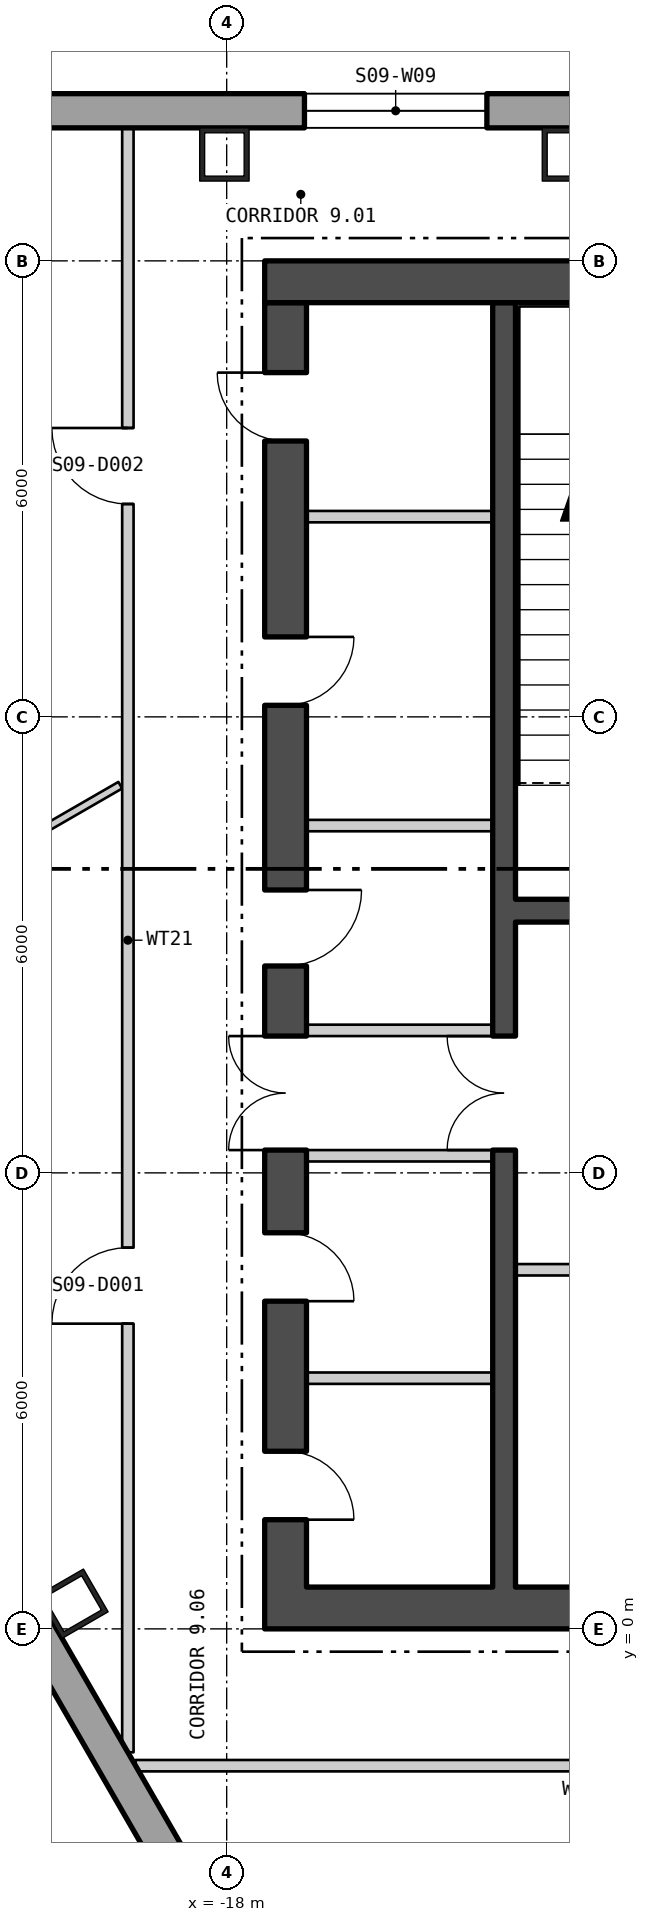
"""IFC4 building model, lengths in metres.
Left out: names, types, materials, properties, quantities, classifications, styles, units other than length and angle.
Written with IfcOpenShell. Run it as: python <this file> out.ifc"""

import sys

from ifc_helpers import new_model, si_unit, direction, frame, frame_2d, origin, origin_2d, place, context, subcontext, project, spatial, polyline, rectangle, hollow_rectangle, outline, extrude, element, fill, save


model = new_model("IFC4")
c1 = context("Model", 3, precision=1e-05, world=origin(), true_north=direction((0.0, 1.0)))
c2 = subcontext(c1, "Body", "Model", "MODEL_VIEW")
j1 = project(units=[si_unit("LENGTHUNIT", "METRE"), si_unit("PLANEANGLEUNIT", "RADIAN")], contexts=[c1])
p1 = place(None, origin())
s1 = spatial("IfcSite", under=j1, at=p1, CompositionType="ELEMENT")
p2 = place(p1, origin())
s2 = spatial("IfcBuilding", under=s1, at=p2, CompositionType="ELEMENT")
p3 = place(p2, frame((0.0, 0.0, 124.8)))
s3 = spatial("IfcBuildingStorey", under=s2, at=p3, CompositionType="ELEMENT", Elevation=124.8)
for number, where, z_axis, x_axis in (
    (1, (-13.523, 19.4, 0.0), (0.0, 0.0, 1.0), (-1.0, 0.0, 0.0)),
    (2, (-18.03, 19.4, 0.0), (0.0, 0.0, 1.0), (-1.0, 0.0, 0.0)),
    (3, (-20.025, 0.331, 0.0), (0.0, 0.0, 1.0), (0.5, -0.866, 0.0)),
):
    element("IfcColumn", number, at=place(p3, frame(where, z_axis=z_axis, x_axis=x_axis)), inside=s3, PredefinedType="COLUMN", context=c2, shape_type="SweptSolid", body=[
        extrude(hollow_rectangle(XDim=0.65, YDim=0.7, WallThickness=0.065, at=origin_2d()), origin(), (0.0, 0.0, 1.0), 4.5),
    ])
p4 = place(p3, frame((22.87, 19.975, -0.4), z_axis=(0.0, 0.0, 1.0), x_axis=(-1.0, 0.0, 0.0)))
e4 = element("IfcWall", 4, at=p4, inside=s3, PredefinedType="SOLIDWALL", context=c2, shape_type="SweptSolid", body=[
    extrude(outline(polyline([(-0.13, -0.225), (45.87, -0.225), (45.61, 0.225), (0.13, 0.225), (-0.13, -0.225)])), origin(), (0.0, 0.0, 1.0), 4.5),
])
p5 = place(p4, frame((1.424, 0.0, 1.3)))
e5 = element("IfcOpeningElement", 5, at=p5, cuts=e4, PredefinedType="OPENING", context=c2, shape_type="SweptSolid", body=[
    extrude(rectangle(XDim=2.4, YDim=2.6, at=frame_2d((1.2, 1.3))), frame((0.0, 0.235, 0.0), z_axis=(0.0, -1.0, 0.0), x_axis=(1.0, 0.0, 0.0)), (0.0, 0.0, 1.0), 0.47),
])
p6 = place(p4, frame((5.893, 0.0, 1.3)))
e6 = element("IfcOpeningElement", 6, at=p6, cuts=e4, PredefinedType="OPENING", context=c2, shape_type="SweptSolid", body=[
    extrude(rectangle(XDim=2.4, YDim=2.6, at=frame_2d((1.2, 1.3))), frame((0.0, 0.235, 0.0), z_axis=(0.0, -1.0, 0.0), x_axis=(1.0, 0.0, 0.0)), (0.0, 0.0, 1.0), 0.47),
])
p7 = place(p4, frame((10.401, 0.0, 1.3)))
e7 = element("IfcOpeningElement", 7, at=p7, cuts=e4, PredefinedType="OPENING", context=c2, shape_type="SweptSolid", body=[
    extrude(rectangle(XDim=2.4, YDim=2.6, at=frame_2d((1.2, 1.3))), frame((0.0, 0.235, 0.0), z_axis=(0.0, -1.0, 0.0), x_axis=(1.0, 0.0, 0.0)), (0.0, 0.0, 1.0), 0.47),
])
p8 = place(p4, frame((14.909, 0.0, 1.3)))
e8 = element("IfcOpeningElement", 8, at=p8, cuts=e4, PredefinedType="OPENING", context=c2, shape_type="SweptSolid", body=[
    extrude(rectangle(XDim=2.4, YDim=2.6, at=frame_2d((1.2, 1.3))), frame((0.0, 0.235, 0.0), z_axis=(0.0, -1.0, 0.0), x_axis=(1.0, 0.0, 0.0)), (0.0, 0.0, 1.0), 0.47),
])
p9 = place(p4, frame((19.416, 0.0, 1.3)))
e9 = element("IfcOpeningElement", 9, at=p9, cuts=e4, PredefinedType="OPENING", context=c2, shape_type="SweptSolid", body=[
    extrude(rectangle(XDim=2.4, YDim=2.6, at=frame_2d((1.2, 1.3))), frame((0.0, 0.235, 0.0), z_axis=(0.0, -1.0, 0.0), x_axis=(1.0, 0.0, 0.0)), (0.0, 0.0, 1.0), 0.47),
])
p10 = place(p4, frame((23.924, 0.0, 1.3)))
e10 = element("IfcOpeningElement", 10, at=p10, cuts=e4, PredefinedType="OPENING", context=c2, shape_type="SweptSolid", body=[
    extrude(rectangle(XDim=2.4, YDim=2.6, at=frame_2d((1.2, 1.3))), frame((0.0, 0.235, 0.0), z_axis=(0.0, -1.0, 0.0), x_axis=(1.0, 0.0, 0.0)), (0.0, 0.0, 1.0), 0.47),
])
p11 = place(p4, frame((28.431, 0.0, 1.3)))
e11 = element("IfcOpeningElement", 11, at=p11, cuts=e4, PredefinedType="OPENING", context=c2, shape_type="SweptSolid", body=[
    extrude(rectangle(XDim=2.4, YDim=2.6, at=frame_2d((1.2, 1.3))), frame((0.0, 0.235, 0.0), z_axis=(0.0, -1.0, 0.0), x_axis=(1.0, 0.0, 0.0)), (0.0, 0.0, 1.0), 0.47),
])
p12 = place(p4, frame((32.939, 0.0, 1.3)))
e12 = element("IfcOpeningElement", 12, at=p12, cuts=e4, PredefinedType="OPENING", context=c2, shape_type="SweptSolid", body=[
    extrude(rectangle(XDim=2.4, YDim=2.6, at=frame_2d((1.2, 1.3))), frame((0.0, 0.235, 0.0), z_axis=(0.0, -1.0, 0.0), x_axis=(1.0, 0.0, 0.0)), (0.0, 0.0, 1.0), 0.47),
])
p13 = place(p4, frame((37.447, 0.0, 1.3)))
e13 = element("IfcOpeningElement", 13, at=p13, cuts=e4, PredefinedType="OPENING", context=c2, shape_type="SweptSolid", body=[
    extrude(rectangle(XDim=2.4, YDim=2.6, at=frame_2d((1.2, 1.3))), frame((0.0, 0.235, 0.0), z_axis=(0.0, -1.0, 0.0), x_axis=(1.0, 0.0, 0.0)), (0.0, 0.0, 1.0), 0.47),
])
p14 = place(p3, frame((-27.45, 12.042, -0.18), z_axis=(0.0, 0.0, 1.0), x_axis=(0.500000711659, -0.866024992908, 0.0)))
e14 = element("IfcWall", 14, at=p14, inside=s3, PredefinedType="SOLIDWALL", context=c2, shape_type="SweptSolid", body=[
    extrude(outline(polyline([(-0.13, -0.225), (45.87, -0.225), (45.61, 0.225), (0.13, 0.225), (-0.13, -0.225)])), origin(), (0.0, 0.0, 1.0), 4.28),
])
p15 = place(p14, frame((1.424, 0.0, 1.08)))
e15 = element("IfcOpeningElement", 15, at=p15, cuts=e14, PredefinedType="OPENING", context=c2, shape_type="SweptSolid", body=[
    extrude(rectangle(XDim=2.4, YDim=2.6, at=frame_2d((1.2, 1.3))), frame((0.0, 0.235, 0.0), z_axis=(0.0, -1.0, 0.0), x_axis=(1.0, 0.0, 0.0)), (0.0, 0.0, 1.0), 0.47),
])
p16 = place(p14, frame((5.893, 0.0, 1.08)))
e16 = element("IfcOpeningElement", 16, at=p16, cuts=e14, PredefinedType="OPENING", context=c2, shape_type="SweptSolid", body=[
    extrude(rectangle(XDim=2.4, YDim=2.6, at=frame_2d((1.2, 1.3))), frame((0.0, 0.235, 0.0), z_axis=(0.0, -1.0, 0.0), x_axis=(1.0, 0.0, 0.0)), (0.0, 0.0, 1.0), 0.47),
])
p17 = place(p14, frame((10.401, 0.0, 1.08)))
e17 = element("IfcOpeningElement", 17, at=p17, cuts=e14, PredefinedType="OPENING", context=c2, shape_type="SweptSolid", body=[
    extrude(rectangle(XDim=2.4, YDim=2.6, at=frame_2d((1.2, 1.3))), frame((0.0, 0.235, 0.0), z_axis=(0.0, -1.0, 0.0), x_axis=(1.0, 0.0, 0.0)), (0.0, 0.0, 1.0), 0.47),
])
p18 = place(p14, frame((19.416, 0.0, 1.08)))
e18 = element("IfcOpeningElement", 18, at=p18, cuts=e14, PredefinedType="OPENING", context=c2, shape_type="SweptSolid", body=[
    extrude(rectangle(XDim=2.4, YDim=2.6, at=frame_2d((1.2, 1.3))), frame((0.0, 0.235, 0.0), z_axis=(0.0, -1.0, 0.0), x_axis=(1.0, 0.0, 0.0)), (0.0, 0.0, 1.0), 0.47),
])
p19 = place(p14, frame((23.924, 0.0, 1.08)))
e19 = element("IfcOpeningElement", 19, at=p19, cuts=e14, PredefinedType="OPENING", context=c2, shape_type="SweptSolid", body=[
    extrude(rectangle(XDim=2.4, YDim=2.6, at=frame_2d((1.2, 1.3))), frame((0.0, 0.235, 0.0), z_axis=(0.0, -1.0, 0.0), x_axis=(1.0, 0.0, 0.0)), (0.0, 0.0, 1.0), 0.47),
])
p20 = place(p14, frame((28.431, 0.0, 1.08)))
e20 = element("IfcOpeningElement", 20, at=p20, cuts=e14, PredefinedType="OPENING", context=c2, shape_type="SweptSolid", body=[
    extrude(rectangle(XDim=2.4, YDim=2.6, at=frame_2d((1.2, 1.3))), frame((0.0, 0.235, 0.0), z_axis=(0.0, -1.0, 0.0), x_axis=(1.0, 0.0, 0.0)), (0.0, 0.0, 1.0), 0.47),
])
p21 = place(p14, frame((32.939, 0.0, 1.08)))
e21 = element("IfcOpeningElement", 21, at=p21, cuts=e14, PredefinedType="OPENING", context=c2, shape_type="SweptSolid", body=[
    extrude(rectangle(XDim=2.4, YDim=2.6, at=frame_2d((1.2, 1.3))), frame((0.0, 0.235, 0.0), z_axis=(0.0, -1.0, 0.0), x_axis=(1.0, 0.0, 0.0)), (0.0, 0.0, 1.0), 0.47),
])
p22 = place(p14, frame((37.447, 0.0, 1.08)))
e22 = element("IfcOpeningElement", 22, at=p22, cuts=e14, PredefinedType="OPENING", context=c2, shape_type="SweptSolid", body=[
    extrude(rectangle(XDim=2.4, YDim=2.6, at=frame_2d((1.2, 1.3))), frame((0.0, 0.235, 0.0), z_axis=(0.0, -1.0, 0.0), x_axis=(1.0, 0.0, 0.0)), (0.0, 0.0, 1.0), 0.47),
])
p23 = place(p14, frame((41.916, 0.0, 1.08)))
e23 = element("IfcOpeningElement", 23, at=p23, cuts=e14, PredefinedType="OPENING", context=c2, shape_type="SweptSolid", body=[
    extrude(rectangle(XDim=2.4, YDim=2.6, at=frame_2d((1.2, 1.3))), frame((0.0, 0.235, 0.0), z_axis=(0.0, -1.0, 0.0), x_axis=(1.0, 0.0, 0.0)), (0.0, 0.0, 1.0), 0.47),
])
p24 = place(p3, frame((-17.5, 0.275, 0.0), z_axis=(0.0, 0.0, 1.0), x_axis=(1.0, 0.0, 0.0)))
e24 = element("IfcWall", 24, at=p24, inside=s3, PredefinedType="SHEAR", context=c2, shape_type="SweptSolid", body=[
    extrude(rectangle(XDim=35.0, YDim=0.55, at=frame_2d((17.5, 0.0))), origin(), (0.0, 0.0, 1.0), 4.3),
])
p25 = place(p24, frame((12.0, 0.0, 0.0)))
e25 = element("IfcOpeningElement", 25, at=p25, cuts=e24, PredefinedType="OPENING", context=c2, shape_type="SweptSolid", body=[
    extrude(rectangle(XDim=1.8, YDim=2.4, at=frame_2d((0.9, 1.2))), frame((0.0, 0.285, 0.0), z_axis=(0.0, -1.0, 0.0), x_axis=(1.0, 0.0, 0.0)), (0.0, 0.0, 1.0), 0.57),
])
p26 = place(p24, frame((22.0, 0.0, 0.0)))
e26 = element("IfcOpeningElement", 26, at=p26, cuts=e24, PredefinedType="OPENING", context=c2, shape_type="SweptSolid", body=[
    extrude(rectangle(XDim=1.8, YDim=2.4, at=frame_2d((0.9, 1.2))), frame((0.0, 0.285, 0.0), z_axis=(0.0, -1.0, 0.0), x_axis=(1.0, 0.0, 0.0)), (0.0, 0.0, 1.0), 0.57),
])
p27 = place(p3, frame((-17.5, 17.725, 0.0), z_axis=(0.0, 0.0, 1.0), x_axis=(1.0, 0.0, 0.0)))
e27 = element("IfcWall", 27, at=p27, inside=s3, PredefinedType="SHEAR", context=c2, shape_type="SweptSolid", body=[
    extrude(rectangle(XDim=35.0, YDim=0.55, at=frame_2d((17.5, 0.0))), origin(), (0.0, 0.0, 1.0), 4.3),
])
p28 = place(p3, frame((-17.225, 0.55, 0.0), z_axis=(0.0, 0.0, 1.0), x_axis=(0.0, 1.0, 0.0)))
e28 = element("IfcWall", 28, at=p28, inside=s3, PredefinedType="SHEAR", context=c2, shape_type="SweptSolid", body=[
    extrude(rectangle(XDim=16.9, YDim=0.55, at=frame_2d((8.45, 0.0))), origin(), (0.0, 0.0, 1.0), 4.3),
])
p29 = place(p28, frame((5.75, 0.0, 0.0)))
e29 = element("IfcOpeningElement", 29, at=p29, cuts=e28, PredefinedType="OPENING", context=c2, shape_type="SweptSolid", body=[
    extrude(rectangle(XDim=1.5, YDim=2.1, at=frame_2d((0.75, 1.05))), frame((0.0, 0.285, 0.0), z_axis=(0.0, -1.0, 0.0), x_axis=(1.0, 0.0, 0.0)), (0.0, 0.0, 1.0), 0.57),
])
p30 = place(p28, frame((0.887, 0.0, 0.0)))
e30 = element("IfcOpeningElement", 30, at=p30, cuts=e28, PredefinedType="OPENING", context=c2, shape_type="SweptSolid", body=[
    extrude(rectangle(XDim=0.9, YDim=2.1, at=frame_2d((0.45, 1.05))), frame((0.0, 0.285, 0.0), z_axis=(0.0, -1.0, 0.0), x_axis=(1.0, 0.0, 0.0)), (0.0, 0.0, 1.0), 0.57),
])
p31 = place(p28, frame((3.762, 0.0, 0.0)))
e31 = element("IfcOpeningElement", 31, at=p31, cuts=e28, PredefinedType="OPENING", context=c2, shape_type="SweptSolid", body=[
    extrude(rectangle(XDim=0.9, YDim=2.1, at=frame_2d((0.45, 1.05))), frame((0.0, 0.285, 0.0), z_axis=(0.0, -1.0, 0.0), x_axis=(1.0, 0.0, 0.0)), (0.0, 0.0, 1.0), 0.57),
])
p32 = place(p28, frame((8.172, 0.0, 0.0)))
e32 = element("IfcOpeningElement", 32, at=p32, cuts=e28, PredefinedType="OPENING", context=c2, shape_type="SweptSolid", body=[
    extrude(rectangle(XDim=1.0, YDim=2.1, at=frame_2d((0.5, 1.05))), frame((0.0, 0.285, 0.0), z_axis=(0.0, -1.0, 0.0), x_axis=(1.0, 0.0, 0.0)), (0.0, 0.0, 1.0), 0.57),
])
p33 = place(p28, frame((11.602, 0.0, 0.0)))
e33 = element("IfcOpeningElement", 33, at=p33, cuts=e28, PredefinedType="OPENING", context=c2, shape_type="SweptSolid", body=[
    extrude(rectangle(XDim=0.9, YDim=2.1, at=frame_2d((0.45, 1.05))), frame((0.0, 0.285, 0.0), z_axis=(0.0, -1.0, 0.0), x_axis=(1.0, 0.0, 0.0)), (0.0, 0.0, 1.0), 0.57),
])
p34 = place(p28, frame((15.08, 0.0, 0.0)))
e34 = element("IfcOpeningElement", 34, at=p34, cuts=e28, PredefinedType="OPENING", context=c2, shape_type="SweptSolid", body=[
    extrude(rectangle(XDim=0.9, YDim=2.1, at=frame_2d((0.45, 1.05))), frame((0.0, 0.285, 0.0), z_axis=(0.0, -1.0, 0.0), x_axis=(1.0, 0.0, 0.0)), (0.0, 0.0, 1.0), 0.57),
])
p35 = place(p3, frame((-14.35, 0.55, 0.0), z_axis=(0.0, 0.0, 1.0), x_axis=(0.0, 1.0, 0.0)))
e35 = element("IfcWall", 35, at=p35, inside=s3, PredefinedType="SHEAR", context=c2, shape_type="SweptSolid", body=[
    extrude(rectangle(XDim=16.9, YDim=0.3, at=frame_2d((8.45, 0.0))), origin(), (0.0, 0.0, 1.0), 4.3),
])
p36 = place(p35, frame((5.75, 0.0, 0.0)))
e36 = element("IfcOpeningElement", 36, at=p36, cuts=e35, PredefinedType="OPENING", context=c2, shape_type="SweptSolid", body=[
    extrude(rectangle(XDim=1.5, YDim=2.1, at=frame_2d((0.75, 1.05))), frame((0.0, 0.16, 0.0), z_axis=(0.0, -1.0, 0.0), x_axis=(1.0, 0.0, 0.0)), (0.0, 0.0, 1.0), 0.32),
])
p37 = place(p3, frame((-14.2, 9.45, 0.0), z_axis=(0.0, 0.0, 1.0), x_axis=(1.0, 0.0, 0.0)))
e37 = element("IfcWall", 37, at=p37, inside=s3, PredefinedType="SHEAR", context=c2, shape_type="SweptSolid", body=[
    extrude(rectangle(XDim=3.2, YDim=0.3, at=frame_2d((1.6, 0.0))), origin(), (0.0, 0.0, 1.0), 4.3),
])
p38 = place(p37, frame((1.0, 0.0, 0.0)))
e38 = element("IfcOpeningElement", 38, at=p38, cuts=e37, PredefinedType="OPENING", context=c2, shape_type="SweptSolid", body=[
    extrude(rectangle(XDim=1.2, YDim=2.1, at=frame_2d((0.6, 1.05))), frame((0.0, 0.16, 0.0), z_axis=(0.0, -1.0, 0.0), x_axis=(1.0, 0.0, 0.0)), (0.0, 0.0, 1.0), 0.32),
])
p39 = place(p3, frame((-14.2, 4.725, 0.0), z_axis=(0.0, 0.0, 1.0), x_axis=(1.0, 0.0, 0.0)))
e39 = element("IfcWall", 39, at=p39, inside=s3, PredefinedType="PARTITIONING", context=c2, shape_type="SweptSolid", body=[
    extrude(rectangle(XDim=3.2, YDim=0.15, at=frame_2d((1.6, 0.0))), origin(), (0.0, 0.0, 1.0), 4.3),
])
for number, where, z_axis, x_axis in (
    (40, (-16.95, 6.225, 0.0), (0.0, 0.0, 1.0), (1.0, 0.0, 0.0)),
    (41, (-16.95, 7.875, 0.0), (0.0, 0.0, 1.0), (1.0, 0.0, 0.0)),
    (42, (-16.95, 3.299, 0.0), (0.0, 0.0, 1.0), (1.0, 0.0, 0.0)),
    (43, (-16.95, 10.57, 0.0), (0.0, 0.0, 1.0), (1.0, 0.0, 0.0)),
    (44, (-16.95, 14.635, 0.0), (0.0, 0.0, 1.0), (1.0, 0.0, 0.0)),
):
    element("IfcWall", number, at=place(p3, frame(where, z_axis=z_axis, x_axis=x_axis)), inside=s3, PredefinedType="PARTITIONING", context=c2, shape_type="SweptSolid", body=[
        extrude(rectangle(XDim=2.45, YDim=0.15, at=frame_2d((1.225, 0.0))), origin(), (0.0, 0.0, 1.0), 4.3),
    ])
p40 = place(p3, frame((-24.446, 8.189, 0.0), z_axis=(0.0, 0.0, 1.0), x_axis=(0.866122712398, 0.499831418649, 0.0)))
e45 = element("IfcWall", 45, at=p40, inside=s3, PredefinedType="PARTITIONING", context=c2, shape_type="SweptSolid", body=[
    extrude(rectangle(XDim=5.826, YDim=0.1, at=frame_2d((2.913, 0.0))), origin(), (0.0, 0.0, 1.0), 4.3),
])
p41 = place(p3, frame((-19.3, -1.624, 0.0), z_axis=(0.0, 0.0, 1.0), x_axis=(0.0, 1.0, 0.0)))
e46 = element("IfcWall", 46, at=p41, inside=s3, PredefinedType="PARTITIONING", context=c2, shape_type="SweptSolid", body=[
    extrude(rectangle(XDim=21.371, YDim=0.15, at=frame_2d((10.685, 0.0))), origin(), (0.0, 0.0, 1.0), 4.3),
])
p42 = place(p41, frame((5.64, 0.0, 0.0)))
e47 = element("IfcOpeningElement", 47, at=p42, cuts=e46, PredefinedType="OPENING", context=c2, shape_type="SweptSolid", body=[
    extrude(rectangle(XDim=1.0, YDim=2.1, at=frame_2d((0.5, 1.05))), frame((0.0, 0.085, 0.0), z_axis=(0.0, -1.0, 0.0), x_axis=(1.0, 0.0, 0.0)), (0.0, 0.0, 1.0), 0.17),
])
p43 = place(p41, frame((16.425, 0.0, 0.0)))
e48 = element("IfcOpeningElement", 48, at=p43, cuts=e46, PredefinedType="OPENING", context=c2, shape_type="SweptSolid", body=[
    extrude(rectangle(XDim=1.0, YDim=2.1, at=frame_2d((0.5, 1.05))), frame((0.0, 0.085, 0.0), z_axis=(0.0, -1.0, 0.0), x_axis=(1.0, 0.0, 0.0)), (0.0, 0.0, 1.0), 0.17),
])
p44 = place(p3, frame((-19.198, -1.8, 0.0), z_axis=(0.0, 0.0, 1.0), x_axis=(1.0, 0.0, 0.0)))
e49 = element("IfcWall", 49, at=p44, inside=s3, PredefinedType="PARTITIONING", context=c2, shape_type="SweptSolid", body=[
    extrude(rectangle(XDim=11.838, YDim=0.15, at=frame_2d((5.919, 0.0))), origin(), (0.0, 0.0, 1.0), 4.3),
])
p45 = place(p13, origin())
e50 = element("IfcWindow", 50, at=p45, inside=s3, PartitioningType="SINGLE_PANEL", PredefinedType="WINDOW", context=c2, shape_type="SweptSolid", body=[
    extrude(rectangle(XDim=2.4, YDim=2.6, at=frame_2d((1.2, 1.3))), frame((0.0, 0.105, 0.0), z_axis=(0.0, -1.0, 0.0), x_axis=(1.0, 0.0, 0.0)), (0.0, 0.0, 1.0), 0.06),
])
fill(e13, e50)
p46 = place(p36, origin())
e51 = element("IfcDoor", 51, at=p46, inside=s3, OperationType="DOUBLE_DOOR_SINGLE_SWING", PredefinedType="DOOR", context=c2, shape_type="SweptSolid", body=[
    extrude(rectangle(XDim=1.5, YDim=2.1, at=frame_2d((0.75, 1.05))), frame((0.0, 0.025, 0.0), z_axis=(0.0, -1.0, 0.0), x_axis=(1.0, 0.0, 0.0)), (0.0, 0.0, 1.0), 0.05),
])
fill(e36, e51)
p47 = place(p29, origin())
e52 = element("IfcDoor", 52, at=p47, inside=s3, OperationType="DOUBLE_DOOR_SINGLE_SWING", PredefinedType="DOOR", context=c2, shape_type="SweptSolid", body=[
    extrude(rectangle(XDim=1.5, YDim=2.1, at=frame_2d((0.75, 1.05))), frame((0.0, 0.025, 0.0), z_axis=(0.0, -1.0, 0.0), x_axis=(1.0, 0.0, 0.0)), (0.0, 0.0, 1.0), 0.05),
])
fill(e29, e52)
p48 = place(p30, origin())
e53 = element("IfcDoor", 53, at=p48, inside=s3, OperationType="SINGLE_SWING_LEFT", PredefinedType="DOOR", context=c2, shape_type="SweptSolid", body=[
    extrude(rectangle(XDim=0.9, YDim=2.1, at=frame_2d((0.45, 1.05))), frame((0.0, 0.025, 0.0), z_axis=(0.0, -1.0, 0.0), x_axis=(1.0, 0.0, 0.0)), (0.0, 0.0, 1.0), 0.05),
])
fill(e30, e53)
p49 = place(p31, origin())
e54 = element("IfcDoor", 54, at=p49, inside=s3, OperationType="SINGLE_SWING_LEFT", PredefinedType="DOOR", context=c2, shape_type="SweptSolid", body=[
    extrude(rectangle(XDim=0.9, YDim=2.1, at=frame_2d((0.45, 1.05))), frame((0.0, 0.025, 0.0), z_axis=(0.0, -1.0, 0.0), x_axis=(1.0, 0.0, 0.0)), (0.0, 0.0, 1.0), 0.05),
])
fill(e31, e54)
p50 = place(p32, origin())
e55 = element("IfcDoor", 55, at=p50, inside=s3, OperationType="SINGLE_SWING_RIGHT", PredefinedType="DOOR", context=c2, shape_type="SweptSolid", body=[
    extrude(rectangle(XDim=1.0, YDim=2.1, at=frame_2d((0.5, 1.05))), frame((0.0, 0.025, 0.0), z_axis=(0.0, -1.0, 0.0), x_axis=(1.0, 0.0, 0.0)), (0.0, 0.0, 1.0), 0.05),
])
fill(e32, e55)
p51 = place(p33, origin())
e56 = element("IfcDoor", 56, at=p51, inside=s3, OperationType="SINGLE_SWING_RIGHT", PredefinedType="DOOR", context=c2, shape_type="SweptSolid", body=[
    extrude(rectangle(XDim=0.9, YDim=2.1, at=frame_2d((0.45, 1.05))), frame((0.0, 0.025, 0.0), z_axis=(0.0, -1.0, 0.0), x_axis=(1.0, 0.0, 0.0)), (0.0, 0.0, 1.0), 0.05),
])
fill(e33, e56)
p52 = place(p34, origin())
e57 = element("IfcDoor", 57, at=p52, inside=s3, OperationType="SINGLE_SWING_LEFT", PredefinedType="DOOR", context=c2, shape_type="SweptSolid", body=[
    extrude(rectangle(XDim=0.9, YDim=2.1, at=frame_2d((0.45, 1.05))), frame((0.0, 0.025, 0.0), z_axis=(0.0, -1.0, 0.0), x_axis=(1.0, 0.0, 0.0)), (0.0, 0.0, 1.0), 0.05),
])
fill(e34, e57)
p53 = place(p42, origin())
e58 = element("IfcDoor", 58, at=p53, inside=s3, OperationType="SINGLE_SWING_RIGHT", PredefinedType="DOOR", context=c2, shape_type="SweptSolid", body=[
    extrude(rectangle(XDim=1.0, YDim=2.1, at=frame_2d((0.5, 1.05))), frame((0.0, 0.025, 0.0), z_axis=(0.0, -1.0, 0.0), x_axis=(1.0, 0.0, 0.0)), (0.0, 0.0, 1.0), 0.05),
])
fill(e47, e58)
p54 = place(p43, origin())
e59 = element("IfcDoor", 59, at=p54, inside=s3, OperationType="SINGLE_SWING_LEFT", PredefinedType="DOOR", context=c2, shape_type="SweptSolid", body=[
    extrude(rectangle(XDim=1.0, YDim=2.1, at=frame_2d((0.5, 1.05))), frame((0.0, 0.025, 0.0), z_axis=(0.0, -1.0, 0.0), x_axis=(1.0, 0.0, 0.0)), (0.0, 0.0, 1.0), 0.05),
])
fill(e48, e59)
save(model, sys.argv[1])
